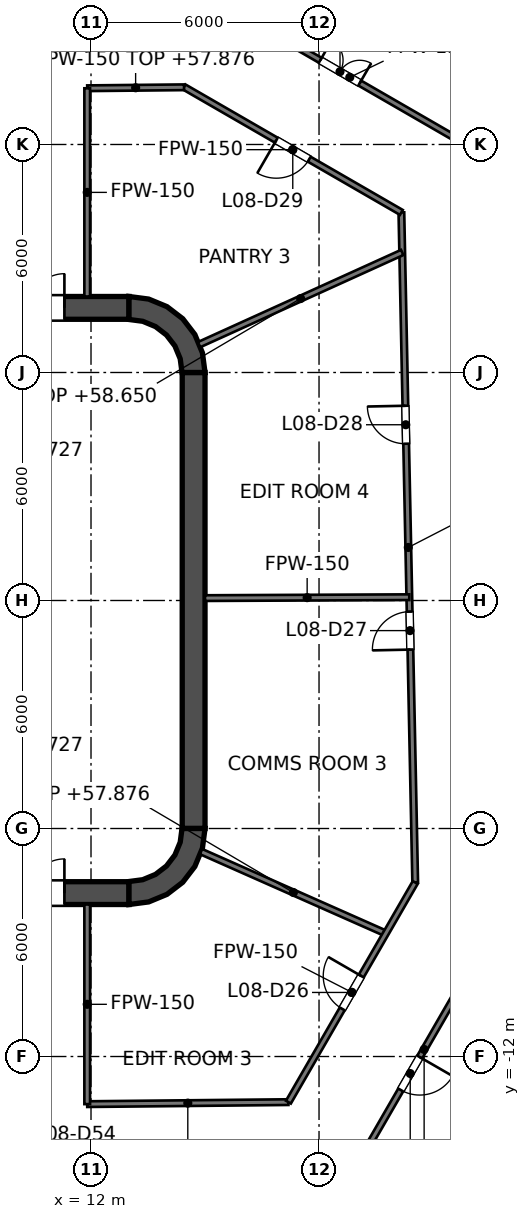
"""IFC4 building model, lengths in metres.
Left out: names, types, materials, properties, quantities, classifications, styles, units other than length and angle.
Written with IfcOpenShell. Run it as: python <this file> out.ifc"""

import sys

from ifc_helpers import new_model, si_unit, direction, frame, frame_2d, origin, place, context, subcontext, project, spatial, polyline, rectangle, outline, extrude, element, fill, save


model = new_model("IFC4")
c1 = context("Model", 3, precision=1e-05, world=origin(), true_north=direction((0.0, 1.0)))
c2 = subcontext(c1, "Body", "Model", "MODEL_VIEW")
j1 = project(units=[si_unit("LENGTHUNIT", "METRE"), si_unit("PLANEANGLEUNIT", "RADIAN")], contexts=[c1])
p1 = place(None, origin())
s1 = spatial("IfcSite", under=j1, at=p1, CompositionType="ELEMENT")
p2 = place(p1, origin())
s2 = spatial("IfcBuilding", under=s1, at=p2, CompositionType="ELEMENT")
p3 = place(p2, frame((0.0, 0.0, 54.6)))
s3 = spatial("IfcBuildingStorey", under=s2, at=p3, CompositionType="ELEMENT", Elevation=54.6)
p4 = place(p3, frame((-13.0, 7.7, 0.0), z_axis=(0.0, 0.0, 1.0), x_axis=(1.0, 0.0, 0.0)))
e1 = element("IfcWall", 1, at=p4, inside=s3, PredefinedType="SHEAR", context=c2, shape_type="SweptSolid", body=[
    extrude(rectangle(XDim=26.0, YDim=0.6, at=frame_2d((13.0, 0.0))), origin(), (0.0, 0.0, 1.0), 4.2),
])
p5 = place(p4, frame((1.7, 0.0, 0.0)))
e2 = element("IfcOpeningElement", 2, at=p5, cuts=e1, PredefinedType="OPENING", context=c2, shape_type="SweptSolid", body=[
    extrude(rectangle(XDim=1.8, YDim=2.1, at=frame_2d((0.9, 1.05))), frame((0.0, 0.3, 0.0), z_axis=(0.0, -1.0, 0.0), x_axis=(1.0, 0.0, 0.0)), (0.0, 0.0, 1.0), 0.6),
])
p6 = place(p4, frame((22.5, 0.0, 0.0)))
e3 = element("IfcOpeningElement", 3, at=p6, cuts=e1, PredefinedType="OPENING", context=c2, shape_type="SweptSolid", body=[
    extrude(rectangle(XDim=1.8, YDim=2.1, at=frame_2d((0.9, 1.05))), frame((0.0, 0.3, 0.0), z_axis=(0.0, -1.0, 0.0), x_axis=(1.0, 0.0, 0.0)), (0.0, 0.0, 1.0), 0.6),
])
p7 = place(p3, frame((-13.0, -7.7, 0.0), z_axis=(0.0, 0.0, 1.0), x_axis=(1.0, 0.0, 0.0)))
e4 = element("IfcWall", 4, at=p7, inside=s3, PredefinedType="SHEAR", context=c2, shape_type="SweptSolid", body=[
    extrude(rectangle(XDim=26.0, YDim=0.6, at=frame_2d((13.0, 0.0))), origin(), (0.0, 0.0, 1.0), 4.2),
])
p8 = place(p7, frame((1.7, 0.0, 0.0)))
e5 = element("IfcOpeningElement", 5, at=p8, cuts=e4, PredefinedType="OPENING", context=c2, shape_type="SweptSolid", body=[
    extrude(rectangle(XDim=1.8, YDim=2.1, at=frame_2d((0.9, 1.05))), frame((0.0, 0.3, 0.0), z_axis=(0.0, -1.0, 0.0), x_axis=(1.0, 0.0, 0.0)), (0.0, 0.0, 1.0), 0.6),
])
p9 = place(p7, frame((22.5, 0.0, 0.0)))
e6 = element("IfcOpeningElement", 6, at=p9, cuts=e4, PredefinedType="OPENING", context=c2, shape_type="SweptSolid", body=[
    extrude(rectangle(XDim=1.8, YDim=2.1, at=frame_2d((0.9, 1.05))), frame((0.0, 0.3, 0.0), z_axis=(0.0, -1.0, 0.0), x_axis=(1.0, 0.0, 0.0)), (0.0, 0.0, 1.0), 0.6),
])
p10 = place(p3, frame((14.7, -6.0, 0.0), z_axis=(0.0, 0.0, 1.0), x_axis=(0.0, 1.0, 0.0)))
e7 = element("IfcWall", 7, at=p10, inside=s3, PredefinedType="SHEAR", context=c2, shape_type="SweptSolid", body=[
    extrude(rectangle(XDim=12.0, YDim=0.6, at=frame_2d((6.0, 0.0))), origin(), (0.0, 0.0, 1.0), 4.2),
])
p11 = place(p3, origin())
e8 = element("IfcWall", 8, at=p11, inside=s3, PredefinedType="SHEAR", context=c2, shape_type="SweptSolid", body=[
    extrude(outline(polyline([(13.0, 8.0), (13.0, 7.395), (13.361, 7.347), (13.698, 7.208), (13.986, 6.986), (14.208, 6.698), (14.347, 6.361), (14.395, 6.0), (15.0, 6.0), (14.932, 6.518), (14.732, 7.0), (14.414, 7.414), (14.0, 7.732), (13.518, 7.932), (13.0, 8.0)])), origin(), (0.0, 0.0, 1.0), 4.2),
])
e9 = element("IfcWall", 9, at=p11, inside=s3, PredefinedType="SHEAR", context=c2, shape_type="SweptSolid", body=[
    extrude(outline(polyline([(15.0, -6.0), (14.395, -6.0), (14.347, -6.361), (14.208, -6.698), (13.986, -6.986), (13.698, -7.208), (13.361, -7.347), (13.0, -7.395), (13.0, -8.0), (13.518, -7.932), (14.0, -7.732), (14.414, -7.414), (14.732, -7.0), (14.932, -6.518), (15.0, -6.0)])), origin(), (0.0, 0.0, 1.0), 4.2),
])
p12 = place(p3, frame((11.8, -7.4, 0.0), z_axis=(0.0, 0.0, 1.0), x_axis=(0.0, 1.0, 0.0)))
e10 = element("IfcWall", 10, at=p12, inside=s3, PredefinedType="SOLIDWALL", context=c2, shape_type="SweptSolid", body=[
    extrude(rectangle(XDim=14.8, YDim=0.4, at=frame_2d((7.4, 0.0))), origin(), (0.0, 0.0, 1.0), 4.05),
])
p13 = place(p12, frame((11.2, 0.0, 0.0)))
e11 = element("IfcOpeningElement", 11, at=p13, cuts=e10, PredefinedType="OPENING", context=c2, shape_type="SweptSolid", body=[
    extrude(rectangle(XDim=1.1, YDim=2.1, at=frame_2d((0.55, 1.05))), frame((0.0, 0.2, 0.0), z_axis=(0.0, -1.0, 0.0), x_axis=(1.0, 0.0, 0.0)), (0.0, 0.0, 1.0), 0.4),
])
p14 = place(p12, frame((8.3, 0.0, 0.0)))
e12 = element("IfcOpeningElement", 12, at=p14, cuts=e10, PredefinedType="OPENING", context=c2, shape_type="SweptSolid", body=[
    extrude(rectangle(XDim=1.1, YDim=2.1, at=frame_2d((0.55, 1.05))), frame((0.0, 0.2, 0.0), z_axis=(0.0, -1.0, 0.0), x_axis=(1.0, 0.0, 0.0)), (0.0, 0.0, 1.0), 0.4),
])
p15 = place(p12, frame((5.4, 0.0, 0.0)))
e13 = element("IfcOpeningElement", 13, at=p15, cuts=e10, PredefinedType="OPENING", context=c2, shape_type="SweptSolid", body=[
    extrude(rectangle(XDim=1.1, YDim=2.1, at=frame_2d((0.55, 1.05))), frame((0.0, 0.2, 0.0), z_axis=(0.0, -1.0, 0.0), x_axis=(1.0, 0.0, 0.0)), (0.0, 0.0, 1.0), 0.4),
])
p16 = place(p12, frame((13.552, 0.0, 0.0)))
e14 = element("IfcOpeningElement", 14, at=p16, cuts=e10, PredefinedType="OPENING", context=c2, shape_type="SweptSolid", body=[
    extrude(rectangle(XDim=0.9, YDim=2.1, at=frame_2d((0.45, 1.05))), frame((0.0, 0.2, 0.0), z_axis=(0.0, -1.0, 0.0), x_axis=(1.0, 0.0, 0.0)), (0.0, 0.0, 1.0), 0.4),
])
p17 = place(p12, frame((0.347, 0.0, 0.0)))
e15 = element("IfcOpeningElement", 15, at=p17, cuts=e10, PredefinedType="OPENING", context=c2, shape_type="SweptSolid", body=[
    extrude(rectangle(XDim=0.9, YDim=2.1, at=frame_2d((0.45, 1.05))), frame((0.0, 0.2, 0.0), z_axis=(0.0, -1.0, 0.0), x_axis=(1.0, 0.0, 0.0)), (0.0, 0.0, 1.0), 0.4),
])
e16 = element("IfcWall", 16, at=p11, inside=s3, PredefinedType="SOLIDWALL", context=c2, shape_type="SweptSolid", body=[
    extrude(outline(polyline([(12.0, -5.675), (12.0, -5.925), (14.15, -5.925), (14.4, -5.925), (14.4, -5.675), (14.4, -3.025), (14.4, -2.775), (14.4, -0.125), (14.4, 0.125), (14.4, 2.775), (14.4, 3.025), (14.4, 5.675), (14.4, 5.925), (14.15, 5.925), (12.0, 5.925), (12.0, 5.675), (14.15, 5.675), (14.15, 3.025), (12.0, 3.025), (12.0, 2.775), (14.15, 2.775), (14.15, 0.125), (12.0, 0.125), (12.0, -0.125), (14.15, -0.125), (14.15, -2.775), (12.0, -2.775), (12.0, -3.025), (14.15, -3.025), (14.15, -5.675), (12.0, -5.675)])), origin(), (0.0, 0.0, 1.0), 4.05),
])
p18 = place(p3, frame((20.167, 10.213, 0.0), z_axis=(0.0, 0.0, 1.0), x_axis=(0.020624730832, -0.999787287616, 0.0)))
e17 = element("IfcWall", 17, at=p18, inside=s3, PredefinedType="PARTITIONING", context=c2, shape_type="SweptSolid", body=[
    extrude(rectangle(XDim=17.637, YDim=0.15, at=frame_2d((8.819, 0.0))), origin(), (0.0, 0.0, 1.0), 3.127),
])
p19 = place(p18, frame((10.508, 0.0, 0.0)))
e18 = element("IfcOpeningElement", 18, at=p19, cuts=e17, PredefinedType="OPENING", context=c2, shape_type="SweptSolid", body=[
    extrude(rectangle(XDim=1.0, YDim=2.1, at=frame_2d((0.5, 1.05))), frame((0.0, 0.075, 0.0), z_axis=(0.0, -1.0, 0.0), x_axis=(1.0, 0.0, 0.0)), (0.0, 0.0, 1.0), 0.15),
])
p20 = place(p18, frame((5.089, 0.0, 0.0)))
e19 = element("IfcOpeningElement", 19, at=p20, cuts=e17, PredefinedType="OPENING", context=c2, shape_type="SweptSolid", body=[
    extrude(rectangle(XDim=1.0, YDim=2.1, at=frame_2d((0.5, 1.05))), frame((0.0, 0.075, 0.0), z_axis=(0.0, -1.0, 0.0), x_axis=(1.0, 0.0, 0.0)), (0.0, 0.0, 1.0), 0.15),
])
p21 = place(p3, frame((14.448, 13.515, 0.0), z_axis=(0.0, 0.0, 1.0), x_axis=(0.865975016585, -0.500087263036, 0.0)))
e20 = element("IfcWall", 20, at=p21, inside=s3, PredefinedType="PARTITIONING", context=c2, shape_type="SweptSolid", body=[
    extrude(rectangle(XDim=6.604, YDim=0.15, at=frame_2d((3.302, 0.0))), origin(), (0.0, 0.0, 1.0), 3.195),
])
p22 = place(p21, frame((2.804, 0.0, 0.0)))
e21 = element("IfcOpeningElement", 21, at=p22, cuts=e20, PredefinedType="OPENING", context=c2, shape_type="SweptSolid", body=[
    extrude(rectangle(XDim=1.0, YDim=2.1, at=frame_2d((0.5, 1.05))), frame((0.0, 0.075, 0.0), z_axis=(0.0, -1.0, 0.0), x_axis=(1.0, 0.0, 0.0)), (0.0, 0.0, 1.0), 0.15),
])
p23 = place(p3, frame((15.08, 15.921, 0.0), z_axis=(0.0, 0.0, 1.0), x_axis=(0.865969836028, -0.500096233828, 0.0)))
e22 = element("IfcWall", 22, at=p23, inside=s3, PredefinedType="PARTITIONING", context=c2, shape_type="SweptSolid", body=[
    extrude(rectangle(XDim=8.613, YDim=0.15, at=frame_2d((4.306, 0.0))), origin(), (0.0, 0.0, 1.0), 3.195),
])
p24 = place(p23, frame((3.409, 0.0, 0.0)))
e23 = element("IfcOpeningElement", 23, at=p24, cuts=e22, PredefinedType="OPENING", context=c2, shape_type="SweptSolid", body=[
    extrude(rectangle(XDim=1.2, YDim=2.1, at=frame_2d((0.6, 1.05))), frame((0.0, 0.075, 0.0), z_axis=(0.0, -1.0, 0.0), x_axis=(1.0, 0.0, 0.0)), (0.0, 0.0, 1.0), 0.15),
])
p25 = place(p3, frame((14.895, -6.607, 0.0), z_axis=(0.0, 0.0, 1.0), x_axis=(0.914233271379, -0.405188259337, 0.0)))
e24 = element("IfcWall", 24, at=p25, inside=s3, PredefinedType="PARTITIONING", context=c2, shape_type="SweptSolid", body=[
    extrude(rectangle(XDim=5.317, YDim=0.15, at=frame_2d((2.659, 0.0))), origin(), (0.0, 0.0, 1.0), 3.276),
])
p26 = place(p3, frame((15.0, 0.063, 0.0), z_axis=(0.0, 0.0, 1.0), x_axis=(0.999990294223, 0.004405843865, 0.0)))
e25 = element("IfcWall", 25, at=p26, inside=s3, PredefinedType="PARTITIONING", context=c2, shape_type="SweptSolid", body=[
    extrude(rectangle(XDim=5.375, YDim=0.15, at=frame_2d((2.688, 0.0))), origin(), (0.0, 0.0, 1.0), 3.195),
])
p27 = place(p3, frame((11.9, -13.253, 0.0), z_axis=(0.0, 0.0, 1.0), x_axis=(0.999950853109, 0.009914200296, 0.0)))
e26 = element("IfcWall", 26, at=p27, inside=s3, PredefinedType="PARTITIONING", context=c2, shape_type="SweptSolid", body=[
    extrude(rectangle(XDim=5.294, YDim=0.15, at=frame_2d((2.647, 0.0))), origin(), (0.0, 0.0, 1.0), 3.276),
])
p28 = place(p3, frame((11.9, 13.48, 0.0), z_axis=(0.0, 0.0, 1.0), x_axis=(0.999950357576, 0.009964054536, 0.0)))
e27 = element("IfcWall", 27, at=p28, inside=s3, PredefinedType="PARTITIONING", context=c2, shape_type="SweptSolid", body=[
    extrude(rectangle(XDim=2.548, YDim=0.15, at=frame_2d((1.274, 0.0))), origin(), (0.0, 0.0, 1.0), 3.276),
])
p29 = place(p3, frame((14.843, 6.733, 0.0), z_axis=(0.0, 0.0, 1.0), x_axis=(0.910628361306, 0.413226315214, 0.0)))
e28 = element("IfcWall", 28, at=p29, inside=s3, PredefinedType="PARTITIONING", context=c2, shape_type="SweptSolid", body=[
    extrude(rectangle(XDim=5.87, YDim=0.15, at=frame_2d((2.935, 0.0))), origin(), (0.0, 0.0, 1.0), 4.05),
])
p30 = place(p3, frame((18.587, -15.587, 0.0), z_axis=(0.0, 0.0, 1.0), x_axis=(0.500026433136, 0.866010142069, 0.0)))
e29 = element("IfcWall", 29, at=p30, inside=s3, PredefinedType="PARTITIONING", context=c2, shape_type="SweptSolid", body=[
    extrude(rectangle(XDim=8.713, YDim=0.15, at=frame_2d((4.357, 0.0))), origin(), (0.0, 0.0, 1.0), 3.195),
])
p31 = place(p30, frame((3.125, 0.0, 0.0)))
e30 = element("IfcOpeningElement", 30, at=p31, cuts=e29, PredefinedType="OPENING", context=c2, shape_type="SweptSolid", body=[
    extrude(rectangle(XDim=1.0, YDim=2.1, at=frame_2d((0.5, 1.05))), frame((0.0, 0.075, 0.0), z_axis=(0.0, -1.0, 0.0), x_axis=(1.0, 0.0, 0.0)), (0.0, 0.0, 1.0), 0.15),
])
p32 = place(p3, frame((17.194, -13.201, 0.0), z_axis=(0.0, 0.0, 1.0), x_axis=(0.50001062018, 0.866019272134, 0.0)))
e31 = element("IfcWall", 31, at=p32, inside=s3, PredefinedType="PARTITIONING", context=c2, shape_type="SweptSolid", body=[
    extrude(rectangle(XDim=6.674, YDim=0.15, at=frame_2d((3.337, 0.0))), origin(), (0.0, 0.0, 1.0), 3.195),
])
p33 = place(p32, frame((2.833, 0.0, 0.0)))
e32 = element("IfcOpeningElement", 32, at=p33, cuts=e31, PredefinedType="OPENING", context=c2, shape_type="SweptSolid", body=[
    extrude(rectangle(XDim=1.0, YDim=2.1, at=frame_2d((0.5, 1.05))), frame((0.0, 0.075, 0.0), z_axis=(0.0, -1.0, 0.0), x_axis=(1.0, 0.0, 0.0)), (0.0, 0.0, 1.0), 0.15),
])
p34 = place(p3, frame((11.9, -13.253, 0.0), z_axis=(0.0, 0.0, 1.0), x_axis=(0.0, 1.0, 0.0)))
e33 = element("IfcWall", 33, at=p34, inside=s3, PredefinedType="PARTITIONING", context=c2, shape_type="SweptSolid", body=[
    extrude(rectangle(XDim=5.253, YDim=0.15, at=frame_2d((2.626, 0.0))), origin(), (0.0, 0.0, 1.0), 3.195),
])
p35 = place(p3, frame((11.9, 8.0, 0.0), z_axis=(0.0, 0.0, 1.0), x_axis=(0.0, 1.0, 0.0)))
e34 = element("IfcWall", 34, at=p35, inside=s3, PredefinedType="PARTITIONING", context=c2, shape_type="SweptSolid", body=[
    extrude(rectangle(XDim=5.479, YDim=0.15, at=frame_2d((2.74, 0.0))), origin(), (0.0, 0.0, 1.0), 3.195),
])
p36 = place(p13, origin())
e35 = element("IfcDoor", 35, at=p36, inside=s3, OperationType="DOUBLE_DOOR_SLIDING", PredefinedType="DOOR", context=c2, shape_type="SweptSolid", body=[
    extrude(rectangle(XDim=1.1, YDim=2.1, at=frame_2d((0.55, 1.05))), frame((0.0, 0.025, 0.0), z_axis=(0.0, -1.0, 0.0), x_axis=(1.0, 0.0, 0.0)), (0.0, 0.0, 1.0), 0.05),
])
fill(e11, e35)
p37 = place(p14, origin())
e36 = element("IfcDoor", 36, at=p37, inside=s3, OperationType="DOUBLE_DOOR_SLIDING", PredefinedType="DOOR", context=c2, shape_type="SweptSolid", body=[
    extrude(rectangle(XDim=1.1, YDim=2.1, at=frame_2d((0.55, 1.05))), frame((0.0, 0.025, 0.0), z_axis=(0.0, -1.0, 0.0), x_axis=(1.0, 0.0, 0.0)), (0.0, 0.0, 1.0), 0.05),
])
fill(e12, e36)
p38 = place(p15, origin())
e37 = element("IfcDoor", 37, at=p38, inside=s3, OperationType="DOUBLE_DOOR_SLIDING", PredefinedType="DOOR", context=c2, shape_type="SweptSolid", body=[
    extrude(rectangle(XDim=1.1, YDim=2.1, at=frame_2d((0.55, 1.05))), frame((0.0, 0.025, 0.0), z_axis=(0.0, -1.0, 0.0), x_axis=(1.0, 0.0, 0.0)), (0.0, 0.0, 1.0), 0.05),
])
fill(e13, e37)
p39 = place(p16, origin())
e38 = element("IfcDoor", 38, at=p39, inside=s3, OperationType="SINGLE_SWING_RIGHT", PredefinedType="DOOR", context=c2, shape_type="SweptSolid", body=[
    extrude(rectangle(XDim=0.9, YDim=2.1, at=frame_2d((0.45, 1.05))), frame((0.0, 0.025, 0.0), z_axis=(0.0, -1.0, 0.0), x_axis=(1.0, 0.0, 0.0)), (0.0, 0.0, 1.0), 0.05),
])
fill(e14, e38)
p40 = place(p17, origin())
e39 = element("IfcDoor", 39, at=p40, inside=s3, OperationType="SINGLE_SWING_RIGHT", PredefinedType="DOOR", context=c2, shape_type="SweptSolid", body=[
    extrude(rectangle(XDim=0.9, YDim=2.1, at=frame_2d((0.45, 1.05))), frame((0.0, 0.025, 0.0), z_axis=(0.0, -1.0, 0.0), x_axis=(1.0, 0.0, 0.0)), (0.0, 0.0, 1.0), 0.05),
])
fill(e15, e39)
p41 = place(p6, origin())
e40 = element("IfcDoor", 40, at=p41, inside=s3, OperationType="DOUBLE_DOOR_SINGLE_SWING", PredefinedType="DOOR", context=c2, shape_type="SweptSolid", body=[
    extrude(rectangle(XDim=1.8, YDim=2.1, at=frame_2d((0.9, 1.05))), frame((0.0, 0.025, 0.0), z_axis=(0.0, -1.0, 0.0), x_axis=(1.0, 0.0, 0.0)), (0.0, 0.0, 1.0), 0.05),
])
fill(e3, e40)
p42 = place(p9, origin())
e41 = element("IfcDoor", 41, at=p42, inside=s3, OperationType="DOUBLE_DOOR_SINGLE_SWING", PredefinedType="DOOR", context=c2, shape_type="SweptSolid", body=[
    extrude(rectangle(XDim=1.8, YDim=2.1, at=frame_2d((0.9, 1.05))), frame((0.0, 0.025, 0.0), z_axis=(0.0, -1.0, 0.0), x_axis=(1.0, 0.0, 0.0)), (0.0, 0.0, 1.0), 0.05),
])
fill(e6, e41)
p43 = place(p33, origin())
e42 = element("IfcDoor", 42, at=p43, inside=s3, OperationType="SINGLE_SWING_RIGHT", PredefinedType="DOOR", context=c2, shape_type="SweptSolid", body=[
    extrude(rectangle(XDim=1.0, YDim=2.1, at=frame_2d((0.5, 1.05))), frame((0.0, 0.025, 0.0), z_axis=(0.0, -1.0, 0.0), x_axis=(1.0, 0.0, 0.0)), (0.0, 0.0, 1.0), 0.05),
])
fill(e32, e42)
p44 = place(p19, origin())
e43 = element("IfcDoor", 43, at=p44, inside=s3, OperationType="SINGLE_SWING_RIGHT", PredefinedType="DOOR", context=c2, shape_type="SweptSolid", body=[
    extrude(rectangle(XDim=1.0, YDim=2.1, at=frame_2d((0.5, 1.05))), frame((0.0, 0.025, 0.0), z_axis=(0.0, -1.0, 0.0), x_axis=(1.0, 0.0, 0.0)), (0.0, 0.0, 1.0), 0.05),
])
fill(e18, e43)
p45 = place(p20, origin())
e44 = element("IfcDoor", 44, at=p45, inside=s3, OperationType="SINGLE_SWING_LEFT", PredefinedType="DOOR", context=c2, shape_type="SweptSolid", body=[
    extrude(rectangle(XDim=1.0, YDim=2.1, at=frame_2d((0.5, 1.05))), frame((0.0, 0.025, 0.0), z_axis=(0.0, -1.0, 0.0), x_axis=(1.0, 0.0, 0.0)), (0.0, 0.0, 1.0), 0.05),
])
fill(e19, e44)
p46 = place(p22, origin())
e45 = element("IfcDoor", 45, at=p46, inside=s3, OperationType="SINGLE_SWING_LEFT", PredefinedType="DOOR", context=c2, shape_type="SweptSolid", body=[
    extrude(rectangle(XDim=1.0, YDim=2.1, at=frame_2d((0.5, 1.05))), frame((0.0, 0.025, 0.0), z_axis=(0.0, -1.0, 0.0), x_axis=(1.0, 0.0, 0.0)), (0.0, 0.0, 1.0), 0.05),
])
fill(e21, e45)
p47 = place(p24, origin())
e46 = element("IfcDoor", 46, at=p47, inside=s3, OperationType="DOUBLE_DOOR_SINGLE_SWING", PredefinedType="DOOR", context=c2, shape_type="SweptSolid", body=[
    extrude(rectangle(XDim=1.2, YDim=2.1, at=frame_2d((0.6, 1.05))), frame((0.0, 0.025, 0.0), z_axis=(0.0, -1.0, 0.0), x_axis=(1.0, 0.0, 0.0)), (0.0, 0.0, 1.0), 0.05),
])
fill(e23, e46)
p48 = place(p31, origin())
e47 = element("IfcDoor", 47, at=p48, inside=s3, OperationType="SINGLE_SWING_RIGHT", PredefinedType="DOOR", context=c2, shape_type="SweptSolid", body=[
    extrude(rectangle(XDim=1.0, YDim=2.1, at=frame_2d((0.5, 1.05))), frame((0.0, 0.025, 0.0), z_axis=(0.0, -1.0, 0.0), x_axis=(1.0, 0.0, 0.0)), (0.0, 0.0, 1.0), 0.05),
])
fill(e30, e47)
save(model, sys.argv[1])
